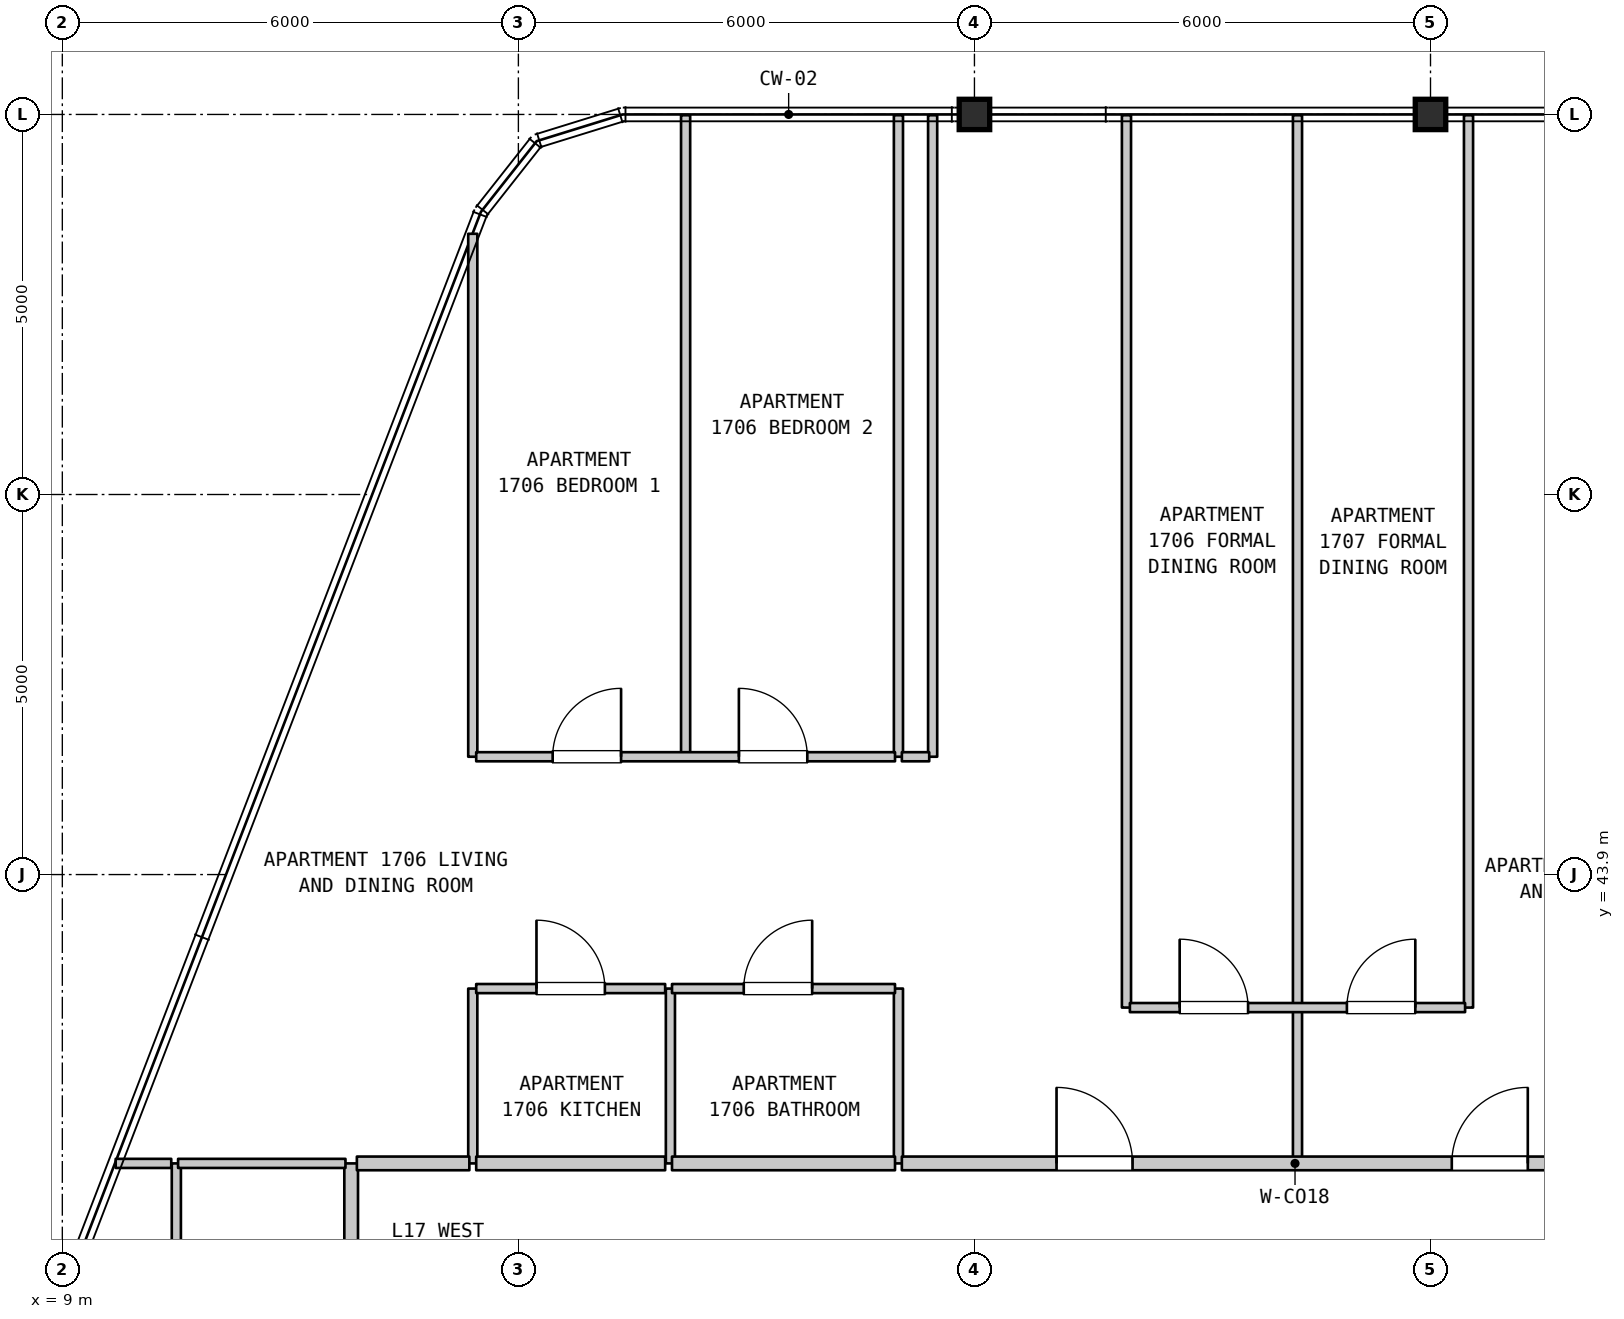
"""IFC4 building model, lengths in metres.
Left out: names, types, materials, properties, quantities, classifications, styles, units other than length and angle.
Written with IfcOpenShell. Run it as: python <this file> out.ifc"""

import sys

from ifc_helpers import new_model, si_unit, direction, frame, frame_2d, origin, origin_2d, place, context, subcontext, project, spatial, rectangle, i_section, extrude, element, fill, save


model = new_model("IFC4")
c1 = context("Model", 3, precision=1e-05, world=origin(), true_north=direction((0.0, 1.0)))
c2 = subcontext(c1, "Body", "Model", "MODEL_VIEW")
j1 = project(units=[si_unit("LENGTHUNIT", "METRE"), si_unit("PLANEANGLEUNIT", "RADIAN")], contexts=[c1])
p1 = place(None, origin())
s1 = spatial("IfcSite", under=j1, at=p1, CompositionType="ELEMENT")
p2 = place(p1, origin())
s2 = spatial("IfcBuilding", under=s1, at=p2, CompositionType="ELEMENT")
p3 = place(p2, frame((0.0, 0.0, 73.8)))
s3 = spatial("IfcBuildingStorey", under=s2, at=p3, CompositionType="ELEMENT", Elevation=73.8)
for number, where, z_axis, x_axis in (
    (1, (21.0, 53.9, 0.0), (0.0, 0.0, 1.0), (1.0, 0.0, 0.0)),
    (2, (27.0, 53.9, 0.0), (0.0, 0.0, 1.0), (1.0, 0.0, 0.0)),
):
    element("IfcColumn", number, at=place(p3, frame(where, z_axis=z_axis, x_axis=x_axis)), inside=s3, PredefinedType="COLUMN", context=c2, shape_type="SweptSolid", body=[
        extrude(i_section(OverallWidth=0.401, OverallDepth=0.399, WebThickness=0.025, FlangeThickness=0.04, FilletRadius=0.015, at=origin_2d()), origin(), (0.0, 0.0, 1.0), 3.7),
    ])
p4 = place(p3, frame((10.5, 31.45, 0.0), z_axis=(0.0, 0.0, 1.0), x_axis=(0.0, 1.0, 0.0)))
e3 = element("IfcWall", 3, at=p4, inside=s3, PredefinedType="PARTITIONING", context=c2, shape_type="SweptSolid", body=[
    extrude(rectangle(XDim=8.65, YDim=0.12, at=frame_2d((4.325, 0.0))), origin(), (0.0, 0.0, 1.0), 3.385),
])
p5 = place(p3, frame((12.8, 31.45, 0.0), z_axis=(0.0, 0.0, 1.0), x_axis=(0.0, 1.0, 0.0)))
e4 = element("IfcWall", 4, at=p5, inside=s3, PredefinedType="STANDARD", context=c2, shape_type="SweptSolid", body=[
    extrude(rectangle(XDim=8.65, YDim=0.18, at=frame_2d((4.325, 0.0))), origin(), (0.0, 0.0, 1.0), 3.385),
])
p6 = place(p3, frame((14.4, 40.1, 0.0), z_axis=(0.0, 0.0, 1.0), x_axis=(0.0, 1.0, 0.0)))
e5 = element("IfcWall", 5, at=p6, inside=s3, PredefinedType="PARTITIONING", context=c2, shape_type="SweptSolid", body=[
    extrude(rectangle(XDim=2.3, YDim=0.12, at=frame_2d((1.15, 0.0))), origin(), (0.0, 0.0, 1.0), 3.385),
])
p7 = place(p3, frame((14.4, 45.45, 0.0), z_axis=(0.0, 0.0, 1.0), x_axis=(0.0, 1.0, 0.0)))
e6 = element("IfcWall", 6, at=p7, inside=s3, PredefinedType="PARTITIONING", context=c2, shape_type="SweptSolid", body=[
    extrude(rectangle(XDim=6.88, YDim=0.12, at=frame_2d((3.44, 0.0))), origin(), (0.0, 0.0, 1.0), 3.385),
])
p8 = place(p3, frame((17.0, 40.1, 0.0), z_axis=(0.0, 0.0, 1.0), x_axis=(0.0, 1.0, 0.0)))
e7 = element("IfcWall", 7, at=p8, inside=s3, PredefinedType="PARTITIONING", context=c2, shape_type="SweptSolid", body=[
    extrude(rectangle(XDim=2.3, YDim=0.12, at=frame_2d((1.15, 0.0))), origin(), (0.0, 0.0, 1.0), 3.385),
])
p9 = place(p3, frame((17.2, 45.45, 0.0), z_axis=(0.0, 0.0, 1.0), x_axis=(0.0, 1.0, 0.0)))
e8 = element("IfcWall", 8, at=p9, inside=s3, PredefinedType="PARTITIONING", context=c2, shape_type="SweptSolid", body=[
    extrude(rectangle(XDim=8.44, YDim=0.12, at=frame_2d((4.22, 0.0))), origin(), (0.0, 0.0, 1.0), 3.385),
])
p10 = place(p3, frame((20.0, 40.1, 0.0), z_axis=(0.0, 0.0, 1.0), x_axis=(0.0, 1.0, 0.0)))
e9 = element("IfcWall", 9, at=p10, inside=s3, PredefinedType="PARTITIONING", context=c2, shape_type="SweptSolid", body=[
    extrude(rectangle(XDim=2.3, YDim=0.12, at=frame_2d((1.15, 0.0))), origin(), (0.0, 0.0, 1.0), 3.385),
])
for number, where, z_axis, x_axis in (
    (10, (20.0, 45.45, 0.0), (0.0, 0.0, 1.0), (0.0, 1.0, 0.0)),
    (11, (20.45, 45.45, 0.0), (0.0, 0.0, 1.0), (0.0, 1.0, 0.0)),
):
    element("IfcWall", number, at=place(p3, frame(where, z_axis=z_axis, x_axis=x_axis)), inside=s3, PredefinedType="PARTITIONING", context=c2, shape_type="SweptSolid", body=[
        extrude(rectangle(XDim=8.44, YDim=0.12, at=frame_2d((4.22, 0.0))), origin(), (0.0, 0.0, 1.0), 3.385),
    ])
p11 = place(p3, frame((23.0, 42.15, 0.0), z_axis=(0.0, 0.0, 1.0), x_axis=(0.0, 1.0, 0.0)))
e12 = element("IfcWall", 12, at=p11, inside=s3, PredefinedType="PARTITIONING", context=c2, shape_type="SweptSolid", body=[
    extrude(rectangle(XDim=11.74, YDim=0.12, at=frame_2d((5.87, 0.0))), origin(), (0.0, 0.0, 1.0), 3.385),
])
p12 = place(p3, frame((25.25, 40.1, 0.0), z_axis=(0.0, 0.0, 1.0), x_axis=(0.0, 1.0, 0.0)))
e13 = element("IfcWall", 13, at=p12, inside=s3, PredefinedType="PARTITIONING", context=c2, shape_type="SweptSolid", body=[
    extrude(rectangle(XDim=2.05, YDim=0.12, at=frame_2d((1.025, 0.0))), origin(), (0.0, 0.0, 1.0), 3.385),
])
for number, where, z_axis, x_axis in (
    (14, (25.25, 42.15, 0.0), (0.0, 0.0, 1.0), (0.0, 1.0, 0.0)),
    (15, (27.5, 42.15, 0.0), (0.0, 0.0, 1.0), (0.0, 1.0, 0.0)),
):
    element("IfcWall", number, at=place(p3, frame(where, z_axis=z_axis, x_axis=x_axis)), inside=s3, PredefinedType="PARTITIONING", context=c2, shape_type="SweptSolid", body=[
        extrude(rectangle(XDim=11.74, YDim=0.12, at=frame_2d((5.87, 0.0))), origin(), (0.0, 0.0, 1.0), 3.385),
    ])
p13 = place(p3, frame((9.702, 40.1, 0.0), z_axis=(0.0, 0.0, 1.0), x_axis=(1.0, 0.0, 0.0)))
e16 = element("IfcWall", 16, at=p13, inside=s3, PredefinedType="PARTITIONING", context=c2, shape_type="SweptSolid", body=[
    extrude(rectangle(XDim=0.731, YDim=0.12, at=frame_2d((0.366, 0.0))), origin(), (0.0, 0.0, 1.0), 3.385),
])
p14 = place(p3, frame((10.523, 40.1, 0.0), z_axis=(0.0, 0.0, 1.0), x_axis=(1.0, 0.0, 0.0)))
e17 = element("IfcWall", 17, at=p14, inside=s3, PredefinedType="PARTITIONING", context=c2, shape_type="SweptSolid", body=[
    extrude(rectangle(XDim=2.202, YDim=0.12, at=frame_2d((1.101, 0.0))), origin(), (0.0, 0.0, 1.0), 3.385),
])
p15 = place(p3, frame((12.875, 40.1, 0.0), z_axis=(0.0, 0.0, 1.0), x_axis=(1.0, 0.0, 0.0)))
e18 = element("IfcWall", 18, at=p15, inside=s3, PredefinedType="STANDARD", context=c2, shape_type="SweptSolid", body=[
    extrude(rectangle(XDim=1.48, YDim=0.18, at=frame_2d((0.74, 0.0))), origin(), (0.0, 0.0, 1.0), 3.385),
])
p16 = place(p3, frame((14.445, 40.1, 0.0), z_axis=(0.0, 0.0, 1.0), x_axis=(1.0, 0.0, 0.0)))
e19 = element("IfcWall", 19, at=p16, inside=s3, PredefinedType="STANDARD", context=c2, shape_type="SweptSolid", body=[
    extrude(rectangle(XDim=2.486, YDim=0.18, at=frame_2d((1.243, 0.0))), origin(), (0.0, 0.0, 1.0), 3.385),
])
p17 = place(p3, frame((17.021, 40.1, 0.0), z_axis=(0.0, 0.0, 1.0), x_axis=(1.0, 0.0, 0.0)))
e20 = element("IfcWall", 20, at=p17, inside=s3, PredefinedType="STANDARD", context=c2, shape_type="SweptSolid", body=[
    extrude(rectangle(XDim=2.934, YDim=0.18, at=frame_2d((1.467, 0.0))), origin(), (0.0, 0.0, 1.0), 3.385),
])
p18 = place(p3, frame((20.045, 40.1, 0.0), z_axis=(0.0, 0.0, 1.0), x_axis=(1.0, 0.0, 0.0)))
e21 = element("IfcWall", 21, at=p18, inside=s3, PredefinedType="STANDARD", context=c2, shape_type="SweptSolid", body=[
    extrude(rectangle(XDim=10.345, YDim=0.18, at=frame_2d((5.172, 0.0))), origin(), (0.0, 0.0, 1.0), 3.385),
])
p19 = place(p18, frame((2.035, 0.0, 0.0)))
e22 = element("IfcOpeningElement", 22, at=p19, cuts=e21, PredefinedType="OPENING", context=c2, shape_type="SweptSolid", body=[
    extrude(rectangle(XDim=1.0, YDim=2.15, at=frame_2d((0.5, 1.075))), frame((0.0, 0.1, 0.0), z_axis=(0.0, -1.0, 0.0), x_axis=(1.0, 0.0, 0.0)), (0.0, 0.0, 1.0), 0.2),
])
p20 = place(p18, frame((7.235, 0.0, 0.0)))
e23 = element("IfcOpeningElement", 23, at=p20, cuts=e21, PredefinedType="OPENING", context=c2, shape_type="SweptSolid", body=[
    extrude(rectangle(XDim=1.0, YDim=2.15, at=frame_2d((0.5, 1.075))), frame((0.0, 0.1, 0.0), z_axis=(0.0, -1.0, 0.0), x_axis=(1.0, 0.0, 0.0)), (0.0, 0.0, 1.0), 0.2),
])
p21 = place(p3, frame((23.045, 42.15, 0.0), z_axis=(0.0, 0.0, 1.0), x_axis=(1.0, 0.0, 0.0)))
e24 = element("IfcWall", 24, at=p21, inside=s3, PredefinedType="PARTITIONING", context=c2, shape_type="SweptSolid", body=[
    extrude(rectangle(XDim=4.41, YDim=0.12, at=frame_2d((2.205, 0.0))), origin(), (0.0, 0.0, 1.0), 3.385),
])
p22 = place(p21, frame((0.655, 0.0, 0.0)))
e25 = element("IfcOpeningElement", 25, at=p22, cuts=e24, PredefinedType="OPENING", context=c2, shape_type="SweptSolid", body=[
    extrude(rectangle(XDim=0.9, YDim=2.15, at=frame_2d((0.45, 1.075))), frame((0.0, 0.07, 0.0), z_axis=(0.0, -1.0, 0.0), x_axis=(1.0, 0.0, 0.0)), (0.0, 0.0, 1.0), 0.14),
])
p23 = place(p21, frame((2.855, 0.0, 0.0)))
e26 = element("IfcOpeningElement", 26, at=p23, cuts=e24, PredefinedType="OPENING", context=c2, shape_type="SweptSolid", body=[
    extrude(rectangle(XDim=0.9, YDim=2.15, at=frame_2d((0.45, 1.075))), frame((0.0, 0.07, 0.0), z_axis=(0.0, -1.0, 0.0), x_axis=(1.0, 0.0, 0.0)), (0.0, 0.0, 1.0), 0.14),
])
p24 = place(p3, frame((14.445, 42.4, 0.0), z_axis=(0.0, 0.0, 1.0), x_axis=(1.0, 0.0, 0.0)))
e27 = element("IfcWall", 27, at=p24, inside=s3, PredefinedType="PARTITIONING", context=c2, shape_type="SweptSolid", body=[
    extrude(rectangle(XDim=2.486, YDim=0.12, at=frame_2d((1.243, 0.0))), origin(), (0.0, 0.0, 1.0), 3.385),
])
p25 = place(p24, frame((0.793, 0.0, 0.0)))
e28 = element("IfcOpeningElement", 28, at=p25, cuts=e27, PredefinedType="OPENING", context=c2, shape_type="SweptSolid", body=[
    extrude(rectangle(XDim=0.9, YDim=2.15, at=frame_2d((0.45, 1.075))), frame((0.0, 0.07, 0.0), z_axis=(0.0, -1.0, 0.0), x_axis=(1.0, 0.0, 0.0)), (0.0, 0.0, 1.0), 0.14),
])
p26 = place(p3, frame((17.021, 42.4, 0.0), z_axis=(0.0, 0.0, 1.0), x_axis=(1.0, 0.0, 0.0)))
e29 = element("IfcWall", 29, at=p26, inside=s3, PredefinedType="PARTITIONING", context=c2, shape_type="SweptSolid", body=[
    extrude(rectangle(XDim=2.934, YDim=0.12, at=frame_2d((1.467, 0.0))), origin(), (0.0, 0.0, 1.0), 3.385),
])
p27 = place(p26, frame((0.944, 0.0, 0.0)))
e30 = element("IfcOpeningElement", 30, at=p27, cuts=e29, PredefinedType="OPENING", context=c2, shape_type="SweptSolid", body=[
    extrude(rectangle(XDim=0.9, YDim=2.1, at=frame_2d((0.45, 1.05))), frame((0.0, 0.07, 0.0), z_axis=(0.0, -1.0, 0.0), x_axis=(1.0, 0.0, 0.0)), (0.0, 0.0, 1.0), 0.14),
])
p28 = place(p3, frame((14.445, 45.45, 0.0), z_axis=(0.0, 0.0, 1.0), x_axis=(1.0, 0.0, 0.0)))
e31 = element("IfcWall", 31, at=p28, inside=s3, PredefinedType="PARTITIONING", context=c2, shape_type="SweptSolid", body=[
    extrude(rectangle(XDim=5.51, YDim=0.12, at=frame_2d((2.755, 0.0))), origin(), (0.0, 0.0, 1.0), 3.385),
])
p29 = place(p28, frame((1.006, 0.0, 0.0)))
e32 = element("IfcOpeningElement", 32, at=p29, cuts=e31, PredefinedType="OPENING", context=c2, shape_type="SweptSolid", body=[
    extrude(rectangle(XDim=0.9, YDim=2.15, at=frame_2d((0.45, 1.075))), frame((0.0, 0.07, 0.0), z_axis=(0.0, -1.0, 0.0), x_axis=(1.0, 0.0, 0.0)), (0.0, 0.0, 1.0), 0.14),
])
p30 = place(p28, frame((3.456, 0.0, 0.0)))
e33 = element("IfcOpeningElement", 33, at=p30, cuts=e31, PredefinedType="OPENING", context=c2, shape_type="SweptSolid", body=[
    extrude(rectangle(XDim=0.9, YDim=2.15, at=frame_2d((0.45, 1.075))), frame((0.0, 0.07, 0.0), z_axis=(0.0, -1.0, 0.0), x_axis=(1.0, 0.0, 0.0)), (0.0, 0.0, 1.0), 0.14),
])
p31 = place(p3, frame((20.045, 45.45, 0.0), z_axis=(0.0, 0.0, 1.0), x_axis=(1.0, 0.0, 0.0)))
e34 = element("IfcWall", 34, at=p31, inside=s3, PredefinedType="PARTITIONING", context=c2, shape_type="SweptSolid", body=[
    extrude(rectangle(XDim=0.36, YDim=0.12, at=frame_2d((0.18, 0.0))), origin(), (0.0, 0.0, 1.0), 3.385),
])
p32 = place(p19, origin())
e35 = element("IfcDoor", 35, at=p32, inside=s3, OperationType="SINGLE_SWING_LEFT", PredefinedType="DOOR", context=c2, shape_type="SweptSolid", body=[
    extrude(rectangle(XDim=1.0, YDim=2.15, at=frame_2d((0.5, 1.075))), frame((0.0, 0.025, 0.0), z_axis=(0.0, -1.0, 0.0), x_axis=(1.0, 0.0, 0.0)), (0.0, 0.0, 1.0), 0.05),
])
fill(e22, e35)
p33 = place(p20, origin())
e36 = element("IfcDoor", 36, at=p33, inside=s3, OperationType="SINGLE_SWING_RIGHT", PredefinedType="DOOR", context=c2, shape_type="SweptSolid", body=[
    extrude(rectangle(XDim=1.0, YDim=2.15, at=frame_2d((0.5, 1.075))), frame((0.0, 0.025, 0.0), z_axis=(0.0, -1.0, 0.0), x_axis=(1.0, 0.0, 0.0)), (0.0, 0.0, 1.0), 0.05),
])
fill(e23, e36)
p34 = place(p22, origin())
e37 = element("IfcDoor", 37, at=p34, inside=s3, OperationType="SINGLE_SWING_LEFT", PredefinedType="DOOR", context=c2, shape_type="SweptSolid", body=[
    extrude(rectangle(XDim=0.9, YDim=2.15, at=frame_2d((0.45, 1.075))), frame((0.0, 0.025, 0.0), z_axis=(0.0, -1.0, 0.0), x_axis=(1.0, 0.0, 0.0)), (0.0, 0.0, 1.0), 0.05),
])
fill(e25, e37)
p35 = place(p23, origin())
e38 = element("IfcDoor", 38, at=p35, inside=s3, OperationType="SINGLE_SWING_RIGHT", PredefinedType="DOOR", context=c2, shape_type="SweptSolid", body=[
    extrude(rectangle(XDim=0.9, YDim=2.15, at=frame_2d((0.45, 1.075))), frame((0.0, 0.025, 0.0), z_axis=(0.0, -1.0, 0.0), x_axis=(1.0, 0.0, 0.0)), (0.0, 0.0, 1.0), 0.05),
])
fill(e26, e38)
p36 = place(p25, origin())
e39 = element("IfcDoor", 39, at=p36, inside=s3, OperationType="SINGLE_SWING_LEFT", PredefinedType="DOOR", context=c2, shape_type="SweptSolid", body=[
    extrude(rectangle(XDim=0.9, YDim=2.15, at=frame_2d((0.45, 1.075))), frame((0.0, 0.025, 0.0), z_axis=(0.0, -1.0, 0.0), x_axis=(1.0, 0.0, 0.0)), (0.0, 0.0, 1.0), 0.05),
])
fill(e28, e39)
p37 = place(p27, origin())
e40 = element("IfcDoor", 40, at=p37, inside=s3, OperationType="SINGLE_SWING_RIGHT", PredefinedType="DOOR", context=c2, shape_type="SweptSolid", body=[
    extrude(rectangle(XDim=0.9, YDim=2.1, at=frame_2d((0.45, 1.05))), frame((0.0, 0.025, 0.0), z_axis=(0.0, -1.0, 0.0), x_axis=(1.0, 0.0, 0.0)), (0.0, 0.0, 1.0), 0.05),
])
fill(e30, e40)
p38 = place(p29, origin())
e41 = element("IfcDoor", 41, at=p38, inside=s3, OperationType="SINGLE_SWING_RIGHT", PredefinedType="DOOR", context=c2, shape_type="SweptSolid", body=[
    extrude(rectangle(XDim=0.9, YDim=2.15, at=frame_2d((0.45, 1.075))), frame((0.0, 0.025, 0.0), z_axis=(0.0, -1.0, 0.0), x_axis=(1.0, 0.0, 0.0)), (0.0, 0.0, 1.0), 0.05),
])
fill(e32, e41)
p39 = place(p30, origin())
e42 = element("IfcDoor", 42, at=p39, inside=s3, OperationType="SINGLE_SWING_LEFT", PredefinedType="DOOR", context=c2, shape_type="SweptSolid", body=[
    extrude(rectangle(XDim=0.9, YDim=2.15, at=frame_2d((0.45, 1.075))), frame((0.0, 0.025, 0.0), z_axis=(0.0, -1.0, 0.0), x_axis=(1.0, 0.0, 0.0)), (0.0, 0.0, 1.0), 0.05),
])
fill(e33, e42)
save(model, sys.argv[1])
